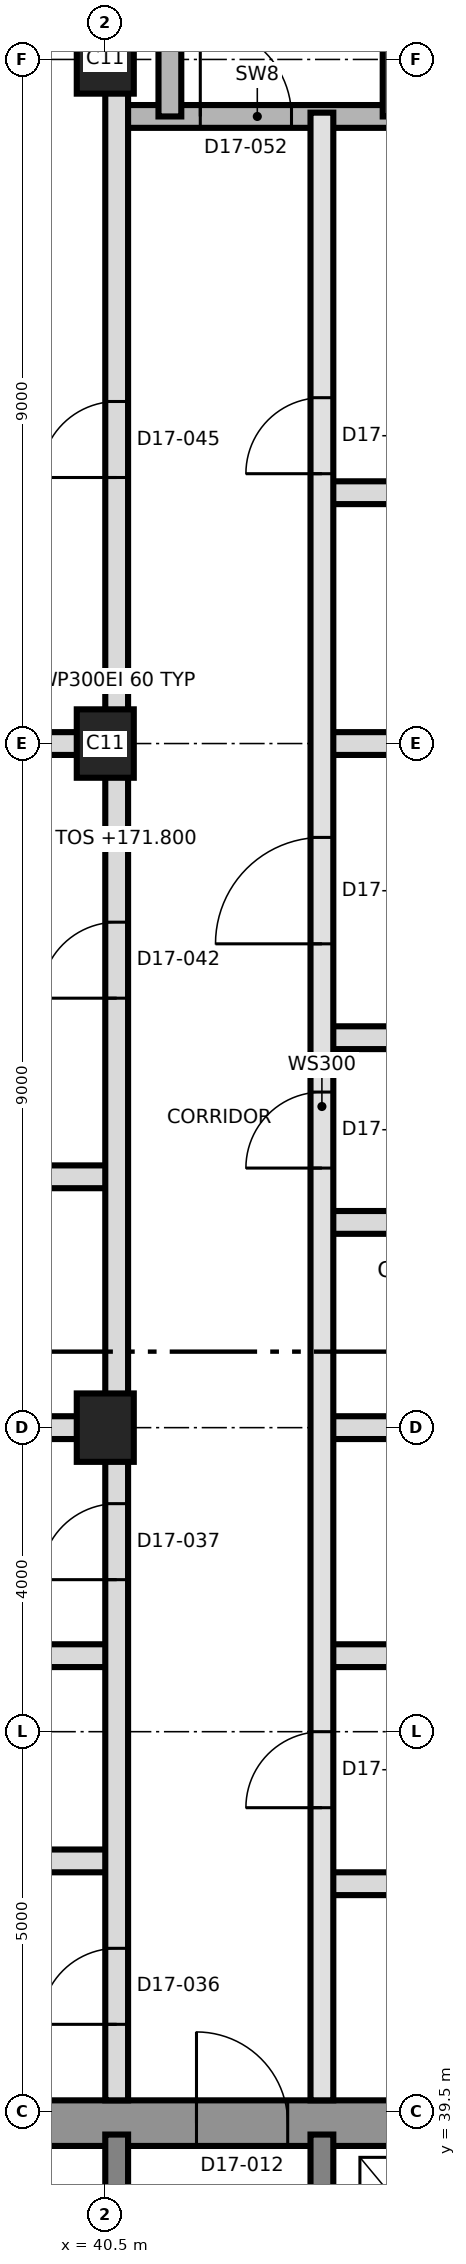
"""IFC4 building model, lengths in metres.
Left out: names, types, materials, properties, quantities, classifications, styles, units other than length and angle.
Written with IfcOpenShell. Run it as: python <this file> out.ifc"""

import sys

from ifc_helpers import new_model, si_unit, direction, frame, frame_2d, origin, origin_2d, place, context, subcontext, project, spatial, rectangle, extrude, element, fill, save


model = new_model("IFC4")
c1 = context("Model", 3, precision=1e-05, world=origin(), true_north=direction((0.0, 1.0)))
c2 = subcontext(c1, "Body", "Model", "MODEL_VIEW")
j1 = project(units=[si_unit("LENGTHUNIT", "METRE"), si_unit("PLANEANGLEUNIT", "RADIAN")], contexts=[c1])
p1 = place(None, origin())
s1 = spatial("IfcSite", under=j1, at=p1, CompositionType="ELEMENT")
p2 = place(p1, origin())
s2 = spatial("IfcBuilding", under=s1, at=p2, CompositionType="ELEMENT")
p3 = place(p2, frame((0.0, 0.0, 171.8)))
s3 = spatial("IfcBuildingStorey", under=s2, at=p3, CompositionType="ELEMENT", Elevation=171.8)
p4 = place(p3, frame((31.2, 39.35, 0.0), z_axis=(0.0, 0.0, 1.0), x_axis=(1.0, 0.0, 0.0)))
e1 = element("IfcWall", 1, at=p4, inside=s3, PredefinedType="SHEAR", context=c2, shape_type="SweptSolid", body=[
    extrude(rectangle(XDim=27.0, YDim=0.6, at=frame_2d((13.5, 0.0))), origin(), (0.0, 0.0, 1.0), 3.7),
])
p5 = place(p4, frame((10.5, 0.0, 0.0)))
e2 = element("IfcOpeningElement", 2, at=p5, cuts=e1, PredefinedType="OPENING", context=c2, shape_type="SweptSolid", body=[
    extrude(rectangle(XDim=1.2, YDim=2.1, at=frame_2d((0.6, 1.05))), frame((0.0, 0.31, 0.0), z_axis=(0.0, -1.0, 0.0), x_axis=(1.0, 0.0, 0.0)), (0.0, 0.0, 1.0), 0.62),
])
for number, where, z_axis, x_axis in (
    (3, (40.65, 33.5, 0.0), (0.0, 0.0, 1.0), (0.0, 1.0, 0.0)),
    (4, (43.35, 33.5, 0.0), (0.0, 0.0, 1.0), (0.0, 1.0, 0.0)),
):
    element("IfcWall", number, at=place(p3, frame(where, z_axis=z_axis, x_axis=x_axis)), inside=s3, PredefinedType="SHEAR", context=c2, shape_type="SweptSolid", body=[
        extrude(rectangle(XDim=5.7, YDim=0.3, at=frame_2d((2.85, 0.0))), origin(), (0.0, 0.0, 1.0), 3.7),
    ])
for number, where, z_axis, x_axis in (
    (5, (40.5, 48.5, 0.0), (0.0, 0.0, 1.0), (0.0, 1.0, 0.0)),
    (6, (40.5, 57.5, 0.0), (0.0, 0.0, 1.0), (0.0, 1.0, 0.0)),
    (7, (40.5, 66.5, 0.0), (0.0, 0.0, 1.0), (0.0, 1.0, 0.0)),
):
    element("IfcColumn", number, at=place(p3, frame(where, z_axis=z_axis, x_axis=x_axis)), inside=s3, PredefinedType="COLUMN", context=c2, shape_type="SweptSolid", body=[
        extrude(rectangle(XDim=0.9, YDim=0.75, at=origin_2d()), origin(), (0.0, 0.0, 1.0), 3.7),
    ])
p6 = place(p3, frame((43.35, 42.5, 0.0), z_axis=(0.0, 0.0, 1.0), x_axis=(1.0, 0.0, 0.0)))
e8 = element("IfcWall", 8, at=p6, inside=s3, PredefinedType="PARTITIONING", context=c2, shape_type="SweptSolid", body=[
    extrude(rectangle(XDim=3.3, YDim=0.3, at=frame_2d((1.65, 0.0))), origin(), (0.0, 0.0, 1.0), 3.4),
])
p7 = place(p3, frame((37.45, 42.8, 0.0), z_axis=(0.0, 0.0, 1.0), x_axis=(1.0, 0.0, 0.0)))
e9 = element("IfcWall", 9, at=p7, inside=s3, PredefinedType="PARTITIONING", context=c2, shape_type="SweptSolid", body=[
    extrude(rectangle(XDim=3.2, YDim=0.3, at=frame_2d((1.6, 0.0))), origin(), (0.0, 0.0, 1.0), 3.4),
])
p8 = place(p3, frame((29.705, 45.5, 0.0), z_axis=(0.0, 0.0, 1.0), x_axis=(1.0, 0.0, 0.0)))
e10 = element("IfcWall", 10, at=p8, inside=s3, PredefinedType="PARTITIONING", context=c2, shape_type="SweptSolid", body=[
    extrude(rectangle(XDim=10.945, YDim=0.3, at=frame_2d((5.472, 0.0))), origin(), (0.0, 0.0, 1.0), 3.4),
])
p9 = place(p3, frame((43.35, 45.5, 0.0), z_axis=(0.0, 0.0, 1.0), x_axis=(1.0, 0.0, 0.0)))
e11 = element("IfcWall", 11, at=p9, inside=s3, PredefinedType="PARTITIONING", context=c2, shape_type="SweptSolid", body=[
    extrude(rectangle(XDim=3.3, YDim=0.3, at=frame_2d((1.65, 0.0))), origin(), (0.0, 0.0, 1.0), 3.4),
])
p10 = place(p3, frame((29.705, 48.5, 0.0), z_axis=(0.0, 0.0, 1.0), x_axis=(1.0, 0.0, 0.0)))
e12 = element("IfcWall", 12, at=p10, inside=s3, PredefinedType="PARTITIONING", context=c2, shape_type="SweptSolid", body=[
    extrude(rectangle(XDim=10.945, YDim=0.3, at=frame_2d((5.472, 0.0))), origin(), (0.0, 0.0, 1.0), 3.4),
])
p11 = place(p3, frame((43.35, 48.5, 0.0), z_axis=(0.0, 0.0, 1.0), x_axis=(1.0, 0.0, 0.0)))
e13 = element("IfcWall", 13, at=p11, inside=s3, PredefinedType="PARTITIONING", context=c2, shape_type="SweptSolid", body=[
    extrude(rectangle(XDim=8.125, YDim=0.3, at=frame_2d((4.062, 0.0))), origin(), (0.0, 0.0, 1.0), 3.4),
])
p12 = place(p3, frame((43.35, 51.2, 0.0), z_axis=(0.0, 0.0, 1.0), x_axis=(1.0, 0.0, 0.0)))
e14 = element("IfcWall", 14, at=p12, inside=s3, PredefinedType="PARTITIONING", context=c2, shape_type="SweptSolid", body=[
    extrude(rectangle(XDim=3.2, YDim=0.3, at=frame_2d((1.6, 0.0))), origin(), (0.0, 0.0, 1.0), 3.4),
])
p13 = place(p3, frame((37.15, 51.8, 0.0), z_axis=(0.0, 0.0, 1.0), x_axis=(1.0, 0.0, 0.0)))
e15 = element("IfcWall", 15, at=p13, inside=s3, PredefinedType="PARTITIONING", context=c2, shape_type="SweptSolid", body=[
    extrude(rectangle(XDim=3.5, YDim=0.3, at=frame_2d((1.75, 0.0))), origin(), (0.0, 0.0, 1.0), 3.4),
])
p14 = place(p3, frame((43.35, 53.63, 0.0), z_axis=(0.0, 0.0, 1.0), x_axis=(1.0, 0.0, 0.0)))
e16 = element("IfcWall", 16, at=p14, inside=s3, PredefinedType="PARTITIONING", context=c2, shape_type="SweptSolid", body=[
    extrude(rectangle(XDim=8.125, YDim=0.3, at=frame_2d((4.062, 0.0))), origin(), (0.0, 0.0, 1.0), 3.4),
])
p15 = place(p3, frame((29.705, 57.5, 0.0), z_axis=(0.0, 0.0, 1.0), x_axis=(1.0, 0.0, 0.0)))
e17 = element("IfcWall", 17, at=p15, inside=s3, PredefinedType="PARTITIONING", context=c2, shape_type="SweptSolid", body=[
    extrude(rectangle(XDim=10.945, YDim=0.3, at=frame_2d((5.472, 0.0))), origin(), (0.0, 0.0, 1.0), 3.4),
])
p16 = place(p3, frame((43.35, 57.5, 0.0), z_axis=(0.0, 0.0, 1.0), x_axis=(1.0, 0.0, 0.0)))
e18 = element("IfcWall", 18, at=p16, inside=s3, PredefinedType="PARTITIONING", context=c2, shape_type="SweptSolid", body=[
    extrude(rectangle(XDim=8.125, YDim=0.3, at=frame_2d((4.062, 0.0))), origin(), (0.0, 0.0, 1.0), 3.4),
])
p17 = place(p3, frame((43.35, 60.8, 0.0), z_axis=(0.0, 0.0, 1.0), x_axis=(1.0, 0.0, 0.0)))
e19 = element("IfcWall", 19, at=p17, inside=s3, PredefinedType="PARTITIONING", context=c2, shape_type="SweptSolid", body=[
    extrude(rectangle(XDim=3.5, YDim=0.3, at=frame_2d((1.75, 0.0))), origin(), (0.0, 0.0, 1.0), 3.4),
])
p18 = place(p3, frame((40.65, 65.75, 0.0), z_axis=(0.0, 0.0, 1.0), x_axis=(1.0, 0.0, 0.0)))
e20 = element("IfcWall", 20, at=p18, inside=s3, PredefinedType="SHEAR", context=c2, shape_type="SweptSolid", body=[
    extrude(rectangle(XDim=3.7, YDim=0.3, at=frame_2d((1.85, 0.0))), origin(), (0.0, 0.0, 1.0), 3.4),
])
p19 = place(p18, frame((1.1, 0.0, 0.0)))
e21 = element("IfcOpeningElement", 21, at=p19, cuts=e20, PredefinedType="OPENING", context=c2, shape_type="SweptSolid", body=[
    extrude(rectangle(XDim=1.2, YDim=2.1, at=frame_2d((0.6, 1.05))), frame((0.0, 0.16, 0.0), z_axis=(0.0, -1.0, 0.0), x_axis=(1.0, 0.0, 0.0)), (0.0, 0.0, 1.0), 0.32),
])
p20 = place(p3, frame((40.65, 39.65, 0.0), z_axis=(0.0, 0.0, 1.0), x_axis=(0.0, 1.0, 0.0)))
e22 = element("IfcWall", 22, at=p20, inside=s3, PredefinedType="PARTITIONING", context=c2, shape_type="SweptSolid", body=[
    extrude(rectangle(XDim=37.35, YDim=0.3, at=frame_2d((18.675, 0.0))), origin(), (0.0, 0.0, 1.0), 3.4),
])
p21 = place(p20, frame((1.0, 0.0, 0.0)))
e23 = element("IfcOpeningElement", 23, at=p21, cuts=e22, PredefinedType="OPENING", context=c2, shape_type="SweptSolid", body=[
    extrude(rectangle(XDim=1.0, YDim=2.1, at=frame_2d((0.5, 1.05))), frame((0.0, 0.16, 0.0), z_axis=(0.0, -1.0, 0.0), x_axis=(1.0, 0.0, 0.0)), (0.0, 0.0, 1.0), 0.32),
])
p22 = place(p20, frame((6.85, 0.0, 0.0)))
e24 = element("IfcOpeningElement", 24, at=p22, cuts=e22, PredefinedType="OPENING", context=c2, shape_type="SweptSolid", body=[
    extrude(rectangle(XDim=1.0, YDim=2.1, at=frame_2d((0.5, 1.05))), frame((0.0, 0.16, 0.0), z_axis=(0.0, -1.0, 0.0), x_axis=(1.0, 0.0, 0.0)), (0.0, 0.0, 1.0), 0.32),
])
p23 = place(p20, frame((14.5, 0.0, 0.0)))
e25 = element("IfcOpeningElement", 25, at=p23, cuts=e22, PredefinedType="OPENING", context=c2, shape_type="SweptSolid", body=[
    extrude(rectangle(XDim=1.0, YDim=2.4, at=frame_2d((0.5, 1.2))), frame((0.0, 0.16, 0.0), z_axis=(0.0, -1.0, 0.0), x_axis=(1.0, 0.0, 0.0)), (0.0, 0.0, 1.0), 0.32),
])
p24 = place(p20, frame((21.35, 0.0, 0.0)))
e26 = element("IfcOpeningElement", 26, at=p24, cuts=e22, PredefinedType="OPENING", context=c2, shape_type="SweptSolid", body=[
    extrude(rectangle(XDim=1.0, YDim=2.4, at=frame_2d((0.5, 1.2))), frame((0.0, 0.16, 0.0), z_axis=(0.0, -1.0, 0.0), x_axis=(1.0, 0.0, 0.0)), (0.0, 0.0, 1.0), 0.32),
])
p25 = place(p3, frame((41.35, 65.75, 0.0), z_axis=(0.0, 0.0, 1.0), x_axis=(0.0, 1.0, 0.0)))
e27 = element("IfcWall", 27, at=p25, inside=s3, PredefinedType="SHEAR", context=c2, shape_type="SweptSolid", body=[
    extrude(rectangle(XDim=8.85, YDim=0.3, at=frame_2d((4.425, 0.0))), origin(), (0.0, 0.0, 1.0), 3.4),
])
p26 = place(p3, frame((43.35, 39.65, 0.0), z_axis=(0.0, 0.0, 1.0), x_axis=(0.0, 1.0, 0.0)))
e28 = element("IfcWall", 28, at=p26, inside=s3, PredefinedType="SOLIDWALL", context=c2, shape_type="SweptSolid", body=[
    extrude(rectangle(XDim=26.15, YDim=0.3, at=frame_2d((13.075, 0.0))), origin(), (0.0, 0.0, 1.0), 3.4),
])
p27 = place(p26, frame((3.85, 0.0, 0.0)))
e29 = element("IfcOpeningElement", 29, at=p27, cuts=e28, PredefinedType="OPENING", context=c2, shape_type="SweptSolid", body=[
    extrude(rectangle(XDim=1.0, YDim=2.4, at=frame_2d((0.5, 1.2))), frame((0.0, 0.16, 0.0), z_axis=(0.0, -1.0, 0.0), x_axis=(1.0, 0.0, 0.0)), (0.0, 0.0, 1.0), 0.32),
])
p28 = place(p26, frame((12.265, 0.0, 0.0)))
e30 = element("IfcOpeningElement", 30, at=p28, cuts=e28, PredefinedType="OPENING", context=c2, shape_type="SweptSolid", body=[
    extrude(rectangle(XDim=1.0, YDim=2.1, at=frame_2d((0.5, 1.05))), frame((0.0, 0.16, 0.0), z_axis=(0.0, -1.0, 0.0), x_axis=(1.0, 0.0, 0.0)), (0.0, 0.0, 1.0), 0.32),
])
p29 = place(p26, frame((15.215, 0.0, 0.0)))
e31 = element("IfcOpeningElement", 31, at=p29, cuts=e28, PredefinedType="OPENING", context=c2, shape_type="SweptSolid", body=[
    extrude(rectangle(XDim=1.4, YDim=2.1, at=frame_2d((0.7, 1.05))), frame((0.0, 0.16, 0.0), z_axis=(0.0, -1.0, 0.0), x_axis=(1.0, 0.0, 0.0)), (0.0, 0.0, 1.0), 0.32),
])
p30 = place(p26, frame((21.4, 0.0, 0.0)))
e32 = element("IfcOpeningElement", 32, at=p30, cuts=e28, PredefinedType="OPENING", context=c2, shape_type="SweptSolid", body=[
    extrude(rectangle(XDim=1.0, YDim=2.4, at=frame_2d((0.5, 1.2))), frame((0.0, 0.16, 0.0), z_axis=(0.0, -1.0, 0.0), x_axis=(1.0, 0.0, 0.0)), (0.0, 0.0, 1.0), 0.32),
])
p31 = place(p3, frame((44.3, 65.75, 0.0), z_axis=(0.0, 0.0, 1.0), x_axis=(0.0, 1.0, 0.0)))
e33 = element("IfcWall", 33, at=p31, inside=s3, PredefinedType="SHEAR", context=c2, shape_type="SweptSolid", body=[
    extrude(rectangle(XDim=8.85, YDim=0.3, at=frame_2d((4.425, 0.0))), origin(), (0.0, 0.0, 1.0), 3.4),
])
p32 = place(p5, origin())
e34 = element("IfcDoor", 34, at=p32, inside=s3, OperationType="SINGLE_SWING_RIGHT", PredefinedType="DOOR", context=c2, shape_type="SweptSolid", body=[
    extrude(rectangle(XDim=1.2, YDim=2.1, at=frame_2d((0.6, 1.05))), frame((0.0, 0.025, 0.0), z_axis=(0.0, -1.0, 0.0), x_axis=(1.0, 0.0, 0.0)), (0.0, 0.0, 1.0), 0.05),
])
fill(e2, e34)
p33 = place(p27, origin())
e35 = element("IfcDoor", 35, at=p33, inside=s3, OperationType="SINGLE_SWING_LEFT", PredefinedType="DOOR", context=c2, shape_type="SweptSolid", body=[
    extrude(rectangle(XDim=1.0, YDim=2.4, at=frame_2d((0.5, 1.2))), frame((0.0, 0.025, 0.0), z_axis=(0.0, -1.0, 0.0), x_axis=(1.0, 0.0, 0.0)), (0.0, 0.0, 1.0), 0.05),
])
fill(e29, e35)
p34 = place(p21, origin())
e36 = element("IfcDoor", 36, at=p34, inside=s3, OperationType="SINGLE_SWING_LEFT", PredefinedType="DOOR", context=c2, shape_type="SweptSolid", body=[
    extrude(rectangle(XDim=1.0, YDim=2.1, at=frame_2d((0.5, 1.05))), frame((0.0, 0.025, 0.0), z_axis=(0.0, -1.0, 0.0), x_axis=(1.0, 0.0, 0.0)), (0.0, 0.0, 1.0), 0.05),
])
fill(e23, e36)
p35 = place(p22, origin())
e37 = element("IfcDoor", 37, at=p35, inside=s3, OperationType="SINGLE_SWING_RIGHT", PredefinedType="DOOR", context=c2, shape_type="SweptSolid", body=[
    extrude(rectangle(XDim=1.0, YDim=2.1, at=frame_2d((0.5, 1.05))), frame((0.0, 0.025, 0.0), z_axis=(0.0, -1.0, 0.0), x_axis=(1.0, 0.0, 0.0)), (0.0, 0.0, 1.0), 0.05),
])
fill(e24, e37)
p36 = place(p28, origin())
e38 = element("IfcDoor", 38, at=p36, inside=s3, OperationType="SINGLE_SWING_LEFT", PredefinedType="DOOR", context=c2, shape_type="SweptSolid", body=[
    extrude(rectangle(XDim=1.0, YDim=2.1, at=frame_2d((0.5, 1.05))), frame((0.0, 0.025, 0.0), z_axis=(0.0, -1.0, 0.0), x_axis=(1.0, 0.0, 0.0)), (0.0, 0.0, 1.0), 0.05),
])
fill(e30, e38)
p37 = place(p29, origin())
e39 = element("IfcDoor", 39, at=p37, inside=s3, OperationType="SINGLE_SWING_RIGHT", PredefinedType="DOOR", context=c2, shape_type="SweptSolid", body=[
    extrude(rectangle(XDim=1.4, YDim=2.1, at=frame_2d((0.7, 1.05))), frame((0.0, 0.025, 0.0), z_axis=(0.0, -1.0, 0.0), x_axis=(1.0, 0.0, 0.0)), (0.0, 0.0, 1.0), 0.05),
])
fill(e31, e39)
p38 = place(p23, origin())
e40 = element("IfcDoor", 40, at=p38, inside=s3, OperationType="SINGLE_SWING_LEFT", PredefinedType="DOOR", context=c2, shape_type="SweptSolid", body=[
    extrude(rectangle(XDim=1.0, YDim=2.4, at=frame_2d((0.5, 1.2))), frame((0.0, 0.025, 0.0), z_axis=(0.0, -1.0, 0.0), x_axis=(1.0, 0.0, 0.0)), (0.0, 0.0, 1.0), 0.05),
])
fill(e25, e40)
p39 = place(p30, origin())
e41 = element("IfcDoor", 41, at=p39, inside=s3, OperationType="SINGLE_SWING_RIGHT", PredefinedType="DOOR", context=c2, shape_type="SweptSolid", body=[
    extrude(rectangle(XDim=1.0, YDim=2.4, at=frame_2d((0.5, 1.2))), frame((0.0, 0.025, 0.0), z_axis=(0.0, -1.0, 0.0), x_axis=(1.0, 0.0, 0.0)), (0.0, 0.0, 1.0), 0.05),
])
fill(e32, e41)
p40 = place(p24, origin())
e42 = element("IfcDoor", 42, at=p40, inside=s3, OperationType="SINGLE_SWING_LEFT", PredefinedType="DOOR", context=c2, shape_type="SweptSolid", body=[
    extrude(rectangle(XDim=1.0, YDim=2.4, at=frame_2d((0.5, 1.2))), frame((0.0, 0.025, 0.0), z_axis=(0.0, -1.0, 0.0), x_axis=(1.0, 0.0, 0.0)), (0.0, 0.0, 1.0), 0.05),
])
fill(e26, e42)
p41 = place(p19, origin())
e43 = element("IfcDoor", 43, at=p41, inside=s3, OperationType="SINGLE_SWING_RIGHT", PredefinedType="DOOR", context=c2, shape_type="SweptSolid", body=[
    extrude(rectangle(XDim=1.2, YDim=2.1, at=frame_2d((0.6, 1.05))), frame((0.0, 0.025, 0.0), z_axis=(0.0, -1.0, 0.0), x_axis=(1.0, 0.0, 0.0)), (0.0, 0.0, 1.0), 0.05),
])
fill(e21, e43)
save(model, sys.argv[1])
